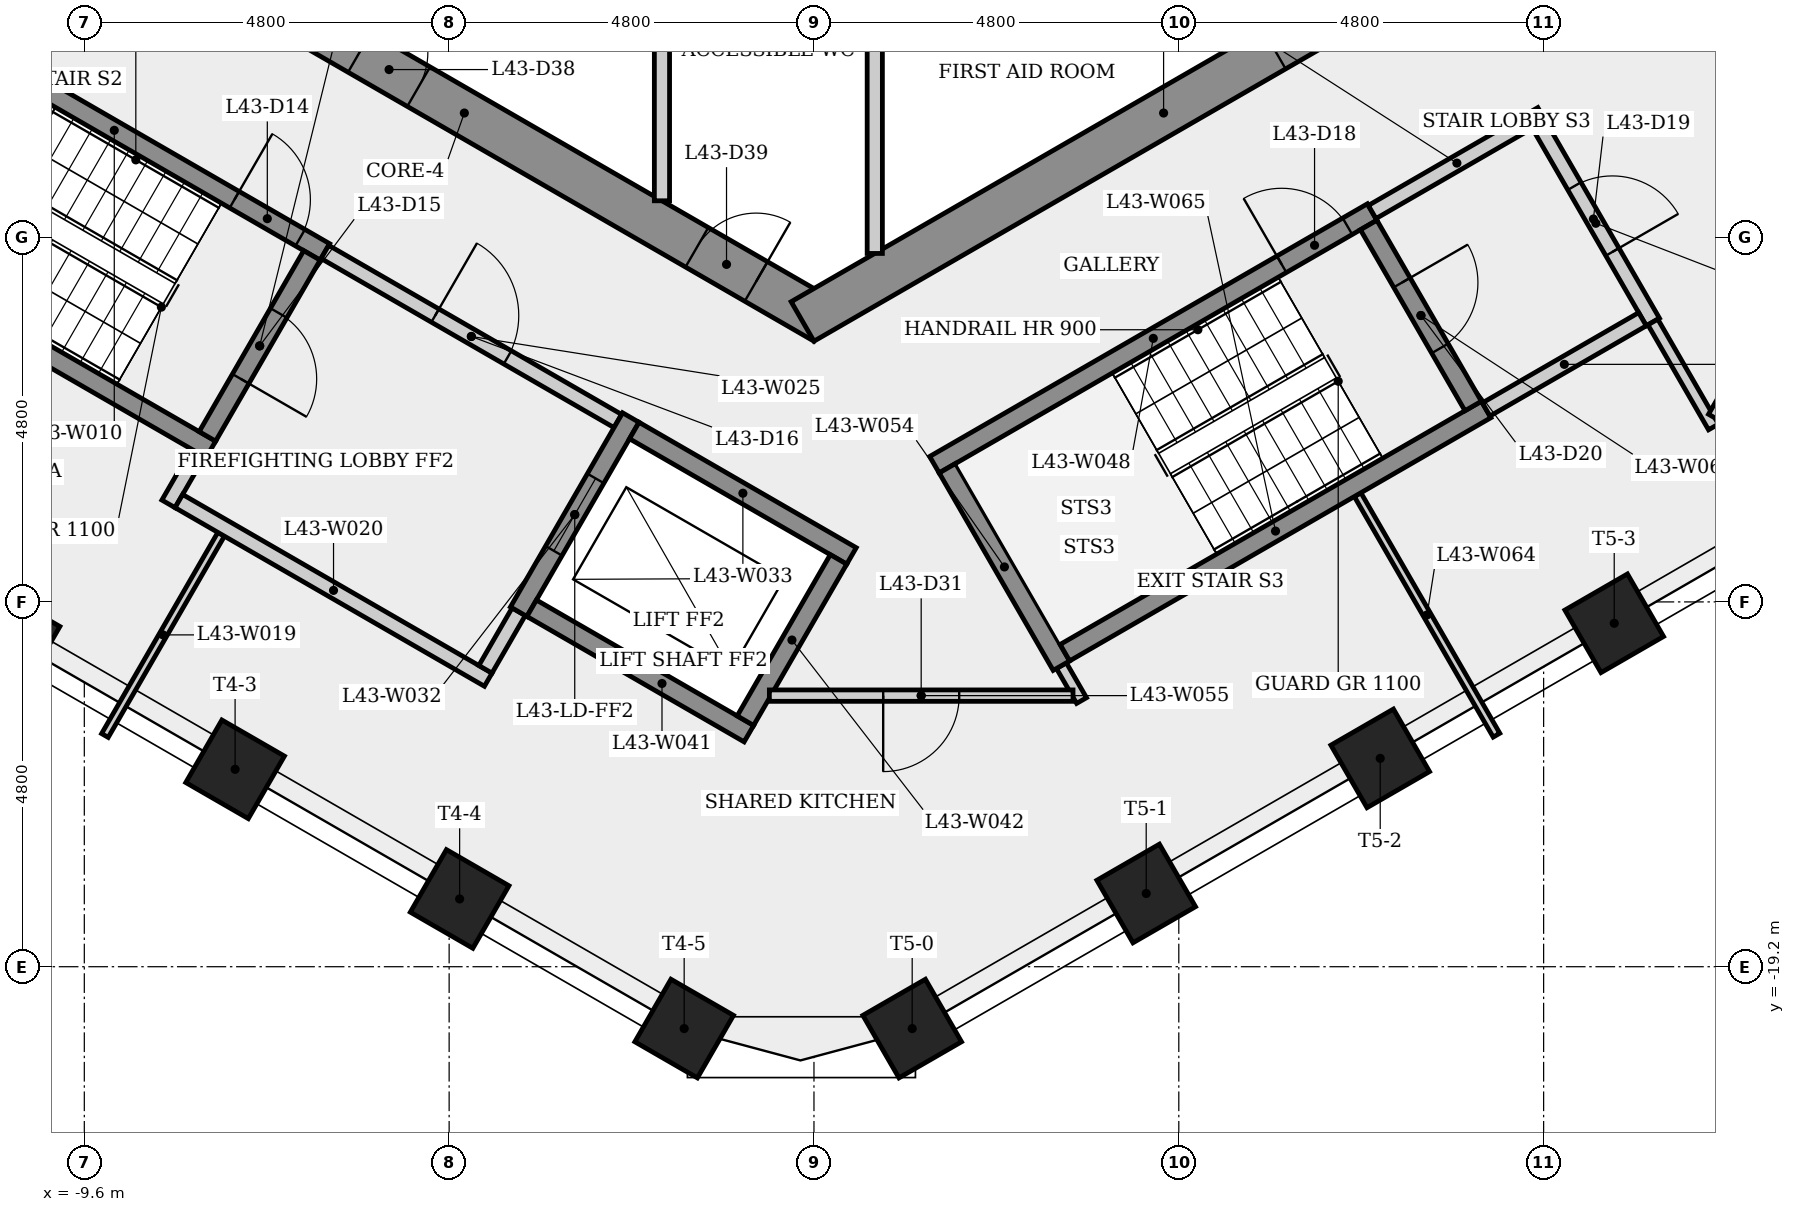
"""IFC4 building model, lengths in metres.
Left out: names, types, materials, properties, quantities, classifications, styles, units other than length and angle.
Written with IfcOpenShell. Run it as: python <this file> out.ifc"""

import sys

from ifc_helpers import new_model, si_unit, direction, frame, frame_2d, origin, origin_2d, place, context, subcontext, project, spatial, rectangle, extrude, element, fill, save


model = new_model("IFC4")
c1 = context("Model", 3, precision=1e-05, world=origin(), true_north=direction((0.0, 1.0)))
c2 = subcontext(c1, "Body", "Model", "MODEL_VIEW")
j1 = project(units=[si_unit("LENGTHUNIT", "METRE"), si_unit("PLANEANGLEUNIT", "RADIAN")], contexts=[c1])
p1 = place(None, origin())
s1 = spatial("IfcSite", under=j1, at=p1, CompositionType="ELEMENT")
p2 = place(p1, origin())
s2 = spatial("IfcBuilding", under=s1, at=p2, CompositionType="ELEMENT")
p3 = place(p2, frame((0.0, 0.0, 162.9)))
s3 = spatial("IfcBuildingStorey", under=s2, at=p3, CompositionType="ELEMENT", Elevation=162.9)
p4 = place(p3, frame((-9.35, -5.225, 0.0), z_axis=(0.0, 0.0, 1.0), x_axis=(0.866023993627, -0.500002442456, 0.0)))
e1 = element("IfcWall", 1, at=p4, inside=s3, PredefinedType="SHEAR", context=c2, shape_type="SweptSolid", body=[
    extrude(rectangle(XDim=10.97, YDim=0.6, at=frame_2d((5.485, 0.0))), origin(), (0.0, 0.0, 1.0), 3.4),
])
p5 = place(p4, frame((3.891, 0.0, 0.0)))
e2 = element("IfcOpeningElement", 2, at=p5, cuts=e1, PredefinedType="OPENING", context=c2, shape_type="SweptSolid", body=[
    extrude(rectangle(XDim=0.9, YDim=2.1, at=frame_2d((0.45, 1.05))), frame((0.0, 0.31, 0.0), z_axis=(0.0, -1.0, 0.0), x_axis=(1.0, 0.0, 0.0)), (0.0, 0.0, 1.0), 0.62),
])
p6 = place(p4, frame((9.018, 0.0, 0.0)))
e3 = element("IfcOpeningElement", 3, at=p6, cuts=e1, PredefinedType="OPENING", context=c2, shape_type="SweptSolid", body=[
    extrude(rectangle(XDim=0.9, YDim=2.1, at=frame_2d((0.45, 1.05))), frame((0.0, 0.31, 0.0), z_axis=(0.0, -1.0, 0.0), x_axis=(1.0, 0.0, 0.0)), (0.0, 0.0, 1.0), 0.62),
])
p7 = place(p3, frame((-0.15, -10.71, 0.0), z_axis=(0.0, 0.0, 1.0), x_axis=(0.866023993627, 0.500002442456, 0.0)))
e4 = element("IfcWall", 4, at=p7, inside=s3, PredefinedType="SHEAR", context=c2, shape_type="SweptSolid", body=[
    extrude(rectangle(XDim=10.97, YDim=0.6, at=frame_2d((5.485, 0.0))), origin(), (0.0, 0.0, 1.0), 3.4),
])
p8 = place(p7, frame((7.166, 0.0, 0.0)))
e5 = element("IfcOpeningElement", 5, at=p8, cuts=e4, PredefinedType="OPENING", context=c2, shape_type="SweptSolid", body=[
    extrude(rectangle(XDim=0.9, YDim=2.1, at=frame_2d((0.45, 1.05))), frame((0.0, 0.31, 0.0), z_axis=(0.0, -1.0, 0.0), x_axis=(1.0, 0.0, 0.0)), (0.0, 0.0, 1.0), 0.62),
])
for number, where, z_axis, x_axis in (
    (6, (-10.57, -14.897, 0.0), (0.0, 0.0, 1.0), (-0.5, -0.866, 0.0)),
    (7, (-7.616, -16.603, 0.0), (0.0, 0.0, 1.0), (-0.5, -0.866, 0.0)),
    (8, (-4.662, -18.308, 0.0), (0.0, 0.0, 1.0), (-0.5, -0.866, 0.0)),
    (9, (-1.708, -20.014, 0.0), (0.0, 0.0, 1.0), (-0.5, -0.866, 0.0)),
    (10, (1.292, -20.014, 0.0), (0.0, 0.0, 1.0), (0.5, -0.866, 0.0)),
    (11, (4.371, -18.237, 0.0), (0.0, 0.0, 1.0), (0.5, -0.866, 0.0)),
    (12, (7.45, -16.459, 0.0), (0.0, 0.0, 1.0), (0.5, -0.866, 0.0)),
    (13, (10.529, -14.681, 0.0), (0.0, 0.0, 1.0), (0.5, -0.866, 0.0)),
):
    element("IfcColumn", number, at=place(p3, frame(where, z_axis=z_axis, x_axis=x_axis)), inside=s3, PredefinedType="COLUMN", context=c2, shape_type="SweptSolid", body=[
        extrude(rectangle(XDim=0.95, YDim=0.95, at=origin_2d()), origin(), (0.0, 0.0, 1.0), 3.4),
    ])
p9 = place(p3, frame((-11.977, -6.595, 0.0), z_axis=(0.0, 0.0, 1.0), x_axis=(0.866025499775, -0.499999833739, 0.0)))
e14 = element("IfcWall", 14, at=p9, inside=s3, PredefinedType="SHEAR", context=c2, shape_type="SweptSolid", body=[
    extrude(rectangle(XDim=6.4, YDim=0.25, at=frame_2d((3.2, 0.0))), origin(), (0.0, 0.0, 1.0), 3.05),
])
p10 = place(p9, frame((5.025, 0.0, 0.0)))
e15 = element("IfcOpeningElement", 15, at=p10, cuts=e14, PredefinedType="OPENING", context=c2, shape_type="SweptSolid", body=[
    extrude(rectangle(XDim=1.0, YDim=2.1, at=frame_2d((0.5, 1.05))), frame((0.0, 0.135, 0.0), z_axis=(0.0, -1.0, 0.0), x_axis=(1.0, 0.0, 0.0)), (0.0, 0.0, 1.0), 0.27),
])
p11 = place(p3, frame((-8.493, -13.11, 0.0), z_axis=(0.0, 0.0, 1.0), x_axis=(0.500067724834, 0.865986299303, 0.0)))
e16 = element("IfcWall", 16, at=p11, inside=s3, PredefinedType="PARTITIONING", context=c2, shape_type="SweptSolid", body=[
    extrude(rectangle(XDim=0.775, YDim=0.2, at=frame_2d((0.388, 0.0))), origin(), (0.0, 0.0, 1.0), 3.05),
])
p12 = place(p3, frame((-7.935, -12.393, 0.0), z_axis=(0.0, 0.0, 1.0), x_axis=(-0.866025499775, 0.499999833739, 0.0)))
e17 = element("IfcWall", 17, at=p12, inside=s3, PredefinedType="SHEAR", context=c2, shape_type="SweptSolid", body=[
    extrude(rectangle(XDim=6.4, YDim=0.25, at=frame_2d((3.2, 0.0))), origin(), (0.0, 0.0, 1.0), 3.05),
])
p13 = place(p3, frame((-7.8, -13.51, 0.0), z_axis=(0.0, 0.0, 1.0), x_axis=(-0.500003532061, -0.866023364538, 0.0)))
e18 = element("IfcWall", 18, at=p13, inside=s3, PredefinedType="PARTITIONING", context=c2, shape_type="SweptSolid", body=[
    extrude(rectangle(XDim=3.058, YDim=0.1, at=frame_2d((1.529, 0.0))), origin(), (0.0, 0.0, 1.0), 3.05),
])
p14 = place(p3, frame((-8.356, -13.073, 0.0), z_axis=(0.0, 0.0, 1.0), x_axis=(0.866038532462, -0.499977259774, 0.0)))
e19 = element("IfcWall", 19, at=p14, inside=s3, PredefinedType="PARTITIONING", context=c2, shape_type="SweptSolid", body=[
    extrude(rectangle(XDim=4.7, YDim=0.2, at=frame_2d((2.35, 0.0))), origin(), (0.0, 0.0, 1.0), 3.05),
])
p15 = place(p3, frame((-6.605, -9.841, 0.0), z_axis=(0.0, 0.0, 1.0), x_axis=(-0.499996545922, -0.866027397988, 0.0)))
e20 = element("IfcWall", 20, at=p15, inside=s3, PredefinedType="SHEAR", context=c2, shape_type="SweptSolid", body=[
    extrude(rectangle(XDim=2.75, YDim=0.25, at=frame_2d((1.375, 0.0))), origin(), (0.0, 0.0, 1.0), 3.05),
])
p16 = place(p15, frame((0.875, 0.0, 0.0)))
e21 = element("IfcOpeningElement", 21, at=p16, cuts=e20, PredefinedType="OPENING", context=c2, shape_type="SweptSolid", body=[
    extrude(rectangle(XDim=1.0, YDim=2.1, at=frame_2d((0.5, 1.05))), frame((0.0, 0.135, 0.0), z_axis=(0.0, -1.0, 0.0), x_axis=(1.0, 0.0, 0.0)), (0.0, 0.0, 1.0), 0.27),
])
p17 = place(p3, frame((-6.435, -9.795, 0.0), z_axis=(0.0, 0.0, 1.0), x_axis=(0.866012907634, -0.500021643343, 0.0)))
e22 = element("IfcWall", 22, at=p17, inside=s3, PredefinedType="PARTITIONING", context=c2, shape_type="SweptSolid", body=[
    extrude(rectangle(XDim=4.45, YDim=0.2, at=frame_2d((2.225, 0.0))), origin(), (0.0, 0.0, 1.0), 3.05),
])
p18 = place(p17, frame((1.675, 0.0, 0.0)))
e23 = element("IfcOpeningElement", 23, at=p18, cuts=e22, PredefinedType="OPENING", context=c2, shape_type="SweptSolid", body=[
    extrude(rectangle(XDim=1.1, YDim=2.1, at=frame_2d((0.55, 1.05))), frame((0.0, 0.11, 0.0), z_axis=(0.0, -1.0, 0.0), x_axis=(1.0, 0.0, 0.0)), (0.0, 0.0, 1.0), 0.22),
])
p19 = place(p3, frame((-3.885, -14.529, 0.0), z_axis=(0.0, 0.0, 1.0), x_axis=(-0.499859285417, -0.866106630146, 0.0)))
e24 = element("IfcWall", 24, at=p19, inside=s3, PredefinedType="PARTITIONING", context=c2, shape_type="SweptSolid", body=[
    extrude(rectangle(XDim=0.875, YDim=0.2, at=frame_2d((0.438, 0.0))), origin(), (0.0, 0.0, 1.0), 3.05),
])
p20 = place(p3, frame((-2.41, -11.974, 0.0), z_axis=(0.0, 0.0, 1.0), x_axis=(-0.500001826776, -0.866024349092, 0.0)))
e25 = element("IfcWall", 25, at=p20, inside=s3, PredefinedType="SHEAR", context=c2, shape_type="SweptSolid", body=[
    extrude(rectangle(XDim=2.95, YDim=0.25, at=frame_2d((1.475, 0.0))), origin(), (0.0, 0.0, 1.0), 3.05),
])
p21 = place(p20, frame((0.925, 0.0, 0.0)))
e26 = element("IfcOpeningElement", 26, at=p21, cuts=e25, PredefinedType="OPENING", context=c2, shape_type="SweptSolid", body=[
    extrude(rectangle(XDim=1.1, YDim=2.1, at=frame_2d((0.55, 1.05))), frame((0.0, 0.135, 0.0), z_axis=(0.0, -1.0, 0.0), x_axis=(1.0, 0.0, 0.0)), (0.0, 0.0, 1.0), 0.27),
])
p22 = place(p3, frame((-2.364, -12.145, 0.0), z_axis=(0.0, 0.0, 1.0), x_axis=(0.866040211805, -0.499974350878, 0.0)))
e27 = element("IfcWall", 27, at=p22, inside=s3, PredefinedType="SHEAR", context=c2, shape_type="SweptSolid", body=[
    extrude(rectangle(XDim=3.3, YDim=0.25, at=frame_2d((1.65, 0.0))), origin(), (0.0, 0.0, 1.0), 3.05),
])
p23 = place(p3, frame((-2.0, -5.25, 0.0), z_axis=(0.0, 0.0, 1.0), x_axis=(0.0, -1.0, 0.0)))
e28 = element("IfcWall", 28, at=p23, inside=s3, PredefinedType="PARTITIONING", context=c2, shape_type="SweptSolid", body=[
    extrude(rectangle(XDim=3.872, YDim=0.2, at=frame_2d((1.936, 0.0))), origin(), (0.0, 0.0, 1.0), 3.05),
])
p24 = place(p3, frame((-0.856, -16.133, 0.0), z_axis=(0.0, 0.0, 1.0), x_axis=(-0.866021716278, 0.500006386895, 0.0)))
e29 = element("IfcWall", 29, at=p24, inside=s3, PredefinedType="SHEAR", context=c2, shape_type="SweptSolid", body=[
    extrude(rectangle(XDim=3.3, YDim=0.25, at=frame_2d((1.65, 0.0))), origin(), (0.0, 0.0, 1.0), 3.05),
])
p25 = place(p3, frame((-0.902, -15.962, 0.0), z_axis=(0.0, 0.0, 1.0), x_axis=(0.500061746146, 0.865989751695, 0.0)))
e30 = element("IfcWall", 30, at=p25, inside=s3, PredefinedType="SHEAR", context=c2, shape_type="SweptSolid", body=[
    extrude(rectangle(XDim=2.45, YDim=0.25, at=frame_2d((1.225, 0.0))), origin(), (0.0, 0.0, 1.0), 3.4),
])
p26 = place(p3, frame((0.8, -5.25, 0.0), z_axis=(0.0, 0.0, 1.0), x_axis=(0.0, -1.0, 0.0)))
e31 = element("IfcWall", 31, at=p26, inside=s3, PredefinedType="PARTITIONING", context=c2, shape_type="SweptSolid", body=[
    extrude(rectangle(XDim=4.565, YDim=0.2, at=frame_2d((2.282, 0.0))), origin(), (0.0, 0.0, 1.0), 3.05),
])
p27 = place(p3, frame((1.585, -12.595, 0.0), z_axis=(0.0, 0.0, 1.0), x_axis=(0.866036417653, 0.499980922934, 0.0)))
e32 = element("IfcWall", 32, at=p27, inside=s3, PredefinedType="SHEAR", context=c2, shape_type="SweptSolid", body=[
    extrude(rectangle(XDim=6.65, YDim=0.25, at=frame_2d((3.325, 0.0))), origin(), (0.0, 0.0, 1.0), 3.05),
])
p28 = place(p27, frame((5.275, 0.0, 0.0)))
e33 = element("IfcOpeningElement", 33, at=p28, cuts=e32, PredefinedType="OPENING", context=c2, shape_type="SweptSolid", body=[
    extrude(rectangle(XDim=1.0, YDim=2.1, at=frame_2d((0.5, 1.05))), frame((0.0, 0.135, 0.0), z_axis=(0.0, -1.0, 0.0), x_axis=(1.0, 0.0, 0.0)), (0.0, 0.0, 1.0), 0.27),
])
p29 = place(p3, frame((3.256, -15.239, 0.0), z_axis=(0.0, 0.0, 1.0), x_axis=(0.500001430823, -0.866024577697, 0.0)))
e34 = element("IfcWall", 34, at=p29, inside=s3, PredefinedType="PARTITIONING", context=c2, shape_type="SweptSolid", body=[
    extrude(rectangle(XDim=0.53, YDim=0.15, at=frame_2d((0.265, 0.0))), origin(), (0.0, 0.0, 1.0), 3.05),
])
p30 = place(p3, frame((3.256, -15.239, 0.0), z_axis=(0.0, 0.0, 1.0), x_axis=(-0.50002537861, 0.866010750942, 0.0)))
e35 = element("IfcWall", 35, at=p30, inside=s3, PredefinedType="SHEAR", context=c2, shape_type="SweptSolid", body=[
    extrude(rectangle(XDim=3.0, YDim=0.25, at=frame_2d((1.5, 0.0))), origin(), (0.0, 0.0, 1.0), 3.05),
])
p31 = place(p3, frame((3.408, -15.633, 0.0), z_axis=(0.0, 0.0, 1.0), x_axis=(-1.0, 0.0, 0.0)))
e36 = element("IfcWall", 36, at=p31, inside=s3, PredefinedType="PARTITIONING", context=c2, shape_type="SweptSolid", body=[
    extrude(rectangle(XDim=3.995, YDim=0.15, at=frame_2d((1.998, 0.0))), origin(), (0.0, 0.0, 1.0), 3.05),
])
p32 = place(p31, frame((1.498, 0.0, 0.0)))
e37 = element("IfcOpeningElement", 37, at=p32, cuts=e36, PredefinedType="OPENING", context=c2, shape_type="SweptSolid", body=[
    extrude(rectangle(XDim=1.0, YDim=2.1, at=frame_2d((0.5, 1.05))), frame((0.0, 0.085, 0.0), z_axis=(0.0, -1.0, 0.0), x_axis=(1.0, 0.0, 0.0)), (0.0, 0.0, 1.0), 0.17),
])
p33 = place(p3, frame((7.153, -12.989, 0.0), z_axis=(0.0, 0.0, 1.0), x_axis=(0.500011578892, -0.866018718605, 0.0)))
e38 = element("IfcWall", 38, at=p33, inside=s3, PredefinedType="PARTITIONING", context=c2, shape_type="SweptSolid", body=[
    extrude(rectangle(XDim=3.655, YDim=0.1, at=frame_2d((1.827, 0.0))), origin(), (0.0, 0.0, 1.0), 3.05),
])
p34 = place(p3, frame((3.301, -15.068, 0.0), z_axis=(0.0, 0.0, 1.0), x_axis=(0.866035036182, 0.499983315828, 0.0)))
e39 = element("IfcWall", 39, at=p34, inside=s3, PredefinedType="SHEAR", context=c2, shape_type="SweptSolid", body=[
    extrude(rectangle(XDim=6.4, YDim=0.25, at=frame_2d((3.2, 0.0))), origin(), (0.0, 0.0, 1.0), 3.05),
])
p35 = place(p3, frame((7.298, -9.441, 0.0), z_axis=(0.0, 0.0, 1.0), x_axis=(0.500034990121, -0.866005201286, 0.0)))
e40 = element("IfcWall", 40, at=p35, inside=s3, PredefinedType="SHEAR", context=c2, shape_type="SweptSolid", body=[
    extrude(rectangle(XDim=2.75, YDim=0.25, at=frame_2d((1.375, 0.0))), origin(), (0.0, 0.0, 1.0), 3.05),
])
p36 = place(p35, frame((0.875, 0.0, 0.0)))
e41 = element("IfcOpeningElement", 41, at=p36, cuts=e40, PredefinedType="OPENING", context=c2, shape_type="SweptSolid", body=[
    extrude(rectangle(XDim=1.0, YDim=2.1, at=frame_2d((0.5, 1.05))), frame((0.0, 0.135, 0.0), z_axis=(0.0, -1.0, 0.0), x_axis=(1.0, 0.0, 0.0)), (0.0, 0.0, 1.0), 0.27),
])
p37 = place(p3, frame((7.344, -9.27, 0.0), z_axis=(0.0, 0.0, 1.0), x_axis=(0.866005588531, 0.500034319456, 0.0)))
e42 = element("IfcWall", 42, at=p37, inside=s3, PredefinedType="PARTITIONING", context=c2, shape_type="SweptSolid", body=[
    extrude(rectangle(XDim=2.575, YDim=0.2, at=frame_2d((1.288, 0.0))), origin(), (0.0, 0.0, 1.0), 3.05),
])
p38 = place(p3, frame((9.537, -8.119, 0.0), z_axis=(0.0, 0.0, 1.0), x_axis=(0.499990139034, -0.866031096941, 0.0)))
e43 = element("IfcWall", 43, at=p38, inside=s3, PredefinedType="PARTITIONING", context=c2, shape_type="SweptSolid", body=[
    extrude(rectangle(XDim=3.0, YDim=0.2, at=frame_2d((1.5, 0.0))), origin(), (0.0, 0.0, 1.0), 3.05),
])
p39 = place(p38, frame((0.935, 0.0, 0.0)))
e44 = element("IfcOpeningElement", 44, at=p39, cuts=e43, PredefinedType="OPENING", context=c2, shape_type="SweptSolid", body=[
    extrude(rectangle(XDim=1.0, YDim=2.1, at=frame_2d((0.5, 1.05))), frame((0.0, 0.11, 0.0), z_axis=(0.0, -1.0, 0.0), x_axis=(1.0, 0.0, 0.0)), (0.0, 0.0, 1.0), 0.22),
])
p40 = place(p3, frame((10.901, -10.681, 0.0), z_axis=(0.0, 0.0, 1.0), x_axis=(-0.866007538022, -0.500030943131, 0.0)))
e45 = element("IfcWall", 45, at=p40, inside=s3, PredefinedType="PARTITIONING", context=c2, shape_type="SweptSolid", body=[
    extrude(rectangle(XDim=2.375, YDim=0.2, at=frame_2d((1.188, 0.0))), origin(), (0.0, 0.0, 1.0), 3.05),
])
p41 = place(p3, frame((11.835, -12.098, 0.0), z_axis=(0.0, 0.0, 1.0), x_axis=(-0.499991908467, 0.866030075383, 0.0)))
e46 = element("IfcWall", 46, at=p41, inside=s3, PredefinedType="PARTITIONING", context=c2, shape_type="SweptSolid", body=[
    extrude(rectangle(XDim=1.595, YDim=0.15, at=frame_2d((0.797, 0.0))), origin(), (0.0, 0.0, 1.0), 3.05),
])
p42 = place(p3, frame((15.741, -5.202, 0.0), z_axis=(0.0, 0.0, 1.0), x_axis=(-0.499974030515, -0.866040396754, 0.0)))
e47 = element("IfcWall", 47, at=p42, inside=s3, PredefinedType="PARTITIONING", context=c2, shape_type="SweptSolid", body=[
    extrude(rectangle(XDim=7.812, YDim=0.15, at=frame_2d((3.906, 0.0))), origin(), (0.0, 0.0, 1.0), 3.05),
])
p43 = place(p42, frame((3.406, 0.0, 0.0)))
e48 = element("IfcOpeningElement", 48, at=p43, cuts=e47, PredefinedType="OPENING", context=c2, shape_type="SweptSolid", body=[
    extrude(rectangle(XDim=1.0, YDim=2.1, at=frame_2d((0.5, 1.05))), frame((0.0, 0.085, 0.0), z_axis=(0.0, -1.0, 0.0), x_axis=(1.0, 0.0, 0.0)), (0.0, 0.0, 1.0), 0.17),
])
p44 = place(p10, origin())
e49 = element("IfcDoor", 49, at=p44, inside=s3, OperationType="SINGLE_SWING_LEFT", PredefinedType="DOOR", context=c2, shape_type="SweptSolid", body=[
    extrude(rectangle(XDim=1.0, YDim=2.1, at=frame_2d((0.5, 1.05))), frame((0.0, 0.025, 0.0), z_axis=(0.0, -1.0, 0.0), x_axis=(1.0, 0.0, 0.0)), (0.0, 0.0, 1.0), 0.05),
])
fill(e15, e49)
p45 = place(p16, origin())
e50 = element("IfcDoor", 50, at=p45, inside=s3, OperationType="SINGLE_SWING_RIGHT", PredefinedType="DOOR", context=c2, shape_type="SweptSolid", body=[
    extrude(rectangle(XDim=1.0, YDim=2.1, at=frame_2d((0.5, 1.05))), frame((0.0, 0.025, 0.0), z_axis=(0.0, -1.0, 0.0), x_axis=(1.0, 0.0, 0.0)), (0.0, 0.0, 1.0), 0.05),
])
fill(e21, e50)
p46 = place(p18, origin())
e51 = element("IfcDoor", 51, at=p46, inside=s3, OperationType="SINGLE_SWING_LEFT", PredefinedType="DOOR", context=c2, shape_type="SweptSolid", body=[
    extrude(rectangle(XDim=1.1, YDim=2.1, at=frame_2d((0.55, 1.05))), frame((0.0, 0.025, 0.0), z_axis=(0.0, -1.0, 0.0), x_axis=(1.0, 0.0, 0.0)), (0.0, 0.0, 1.0), 0.05),
])
fill(e23, e51)
p47 = place(p21, origin())
e52 = element("IfcDoor", 52, at=p47, inside=s3, OperationType="SLIDING_TO_LEFT", PredefinedType="DOOR", context=c2, shape_type="SweptSolid", body=[
    extrude(rectangle(XDim=1.1, YDim=2.1, at=frame_2d((0.55, 1.05))), frame((0.0, 0.025, 0.0), z_axis=(0.0, -1.0, 0.0), x_axis=(1.0, 0.0, 0.0)), (0.0, 0.0, 1.0), 0.05),
])
fill(e26, e52)
p48 = place(p28, origin())
e53 = element("IfcDoor", 53, at=p48, inside=s3, OperationType="SINGLE_SWING_LEFT", PredefinedType="DOOR", context=c2, shape_type="SweptSolid", body=[
    extrude(rectangle(XDim=1.0, YDim=2.1, at=frame_2d((0.5, 1.05))), frame((0.0, 0.025, 0.0), z_axis=(0.0, -1.0, 0.0), x_axis=(1.0, 0.0, 0.0)), (0.0, 0.0, 1.0), 0.05),
])
fill(e33, e53)
p49 = place(p39, origin())
e54 = element("IfcDoor", 54, at=p49, inside=s3, OperationType="SINGLE_SWING_RIGHT", PredefinedType="DOOR", context=c2, shape_type="SweptSolid", body=[
    extrude(rectangle(XDim=1.0, YDim=2.1, at=frame_2d((0.5, 1.05))), frame((0.0, 0.025, 0.0), z_axis=(0.0, -1.0, 0.0), x_axis=(1.0, 0.0, 0.0)), (0.0, 0.0, 1.0), 0.05),
])
fill(e44, e54)
p50 = place(p36, origin())
e55 = element("IfcDoor", 55, at=p50, inside=s3, OperationType="SINGLE_SWING_LEFT", PredefinedType="DOOR", context=c2, shape_type="SweptSolid", body=[
    extrude(rectangle(XDim=1.0, YDim=2.1, at=frame_2d((0.5, 1.05))), frame((0.0, 0.025, 0.0), z_axis=(0.0, -1.0, 0.0), x_axis=(1.0, 0.0, 0.0)), (0.0, 0.0, 1.0), 0.05),
])
fill(e41, e55)
p51 = place(p32, origin())
e56 = element("IfcDoor", 56, at=p51, inside=s3, OperationType="SINGLE_SWING_RIGHT", PredefinedType="DOOR", context=c2, shape_type="SweptSolid", body=[
    extrude(rectangle(XDim=1.0, YDim=2.1, at=frame_2d((0.5, 1.05))), frame((0.0, 0.025, 0.0), z_axis=(0.0, -1.0, 0.0), x_axis=(1.0, 0.0, 0.0)), (0.0, 0.0, 1.0), 0.05),
])
fill(e37, e56)
p52 = place(p5, origin())
e57 = element("IfcDoor", 57, at=p52, inside=s3, OperationType="SINGLE_SWING_LEFT", PredefinedType="DOOR", context=c2, shape_type="SweptSolid", body=[
    extrude(rectangle(XDim=0.9, YDim=2.1, at=frame_2d((0.45, 1.05))), frame((0.0, 0.025, 0.0), z_axis=(0.0, -1.0, 0.0), x_axis=(1.0, 0.0, 0.0)), (0.0, 0.0, 1.0), 0.05),
])
fill(e2, e57)
p53 = place(p6, origin())
e58 = element("IfcDoor", 58, at=p53, inside=s3, OperationType="SINGLE_SWING_RIGHT", PredefinedType="DOOR", context=c2, shape_type="SweptSolid", body=[
    extrude(rectangle(XDim=0.9, YDim=2.1, at=frame_2d((0.45, 1.05))), frame((0.0, 0.025, 0.0), z_axis=(0.0, -1.0, 0.0), x_axis=(1.0, 0.0, 0.0)), (0.0, 0.0, 1.0), 0.05),
])
fill(e3, e58)
save(model, sys.argv[1])
